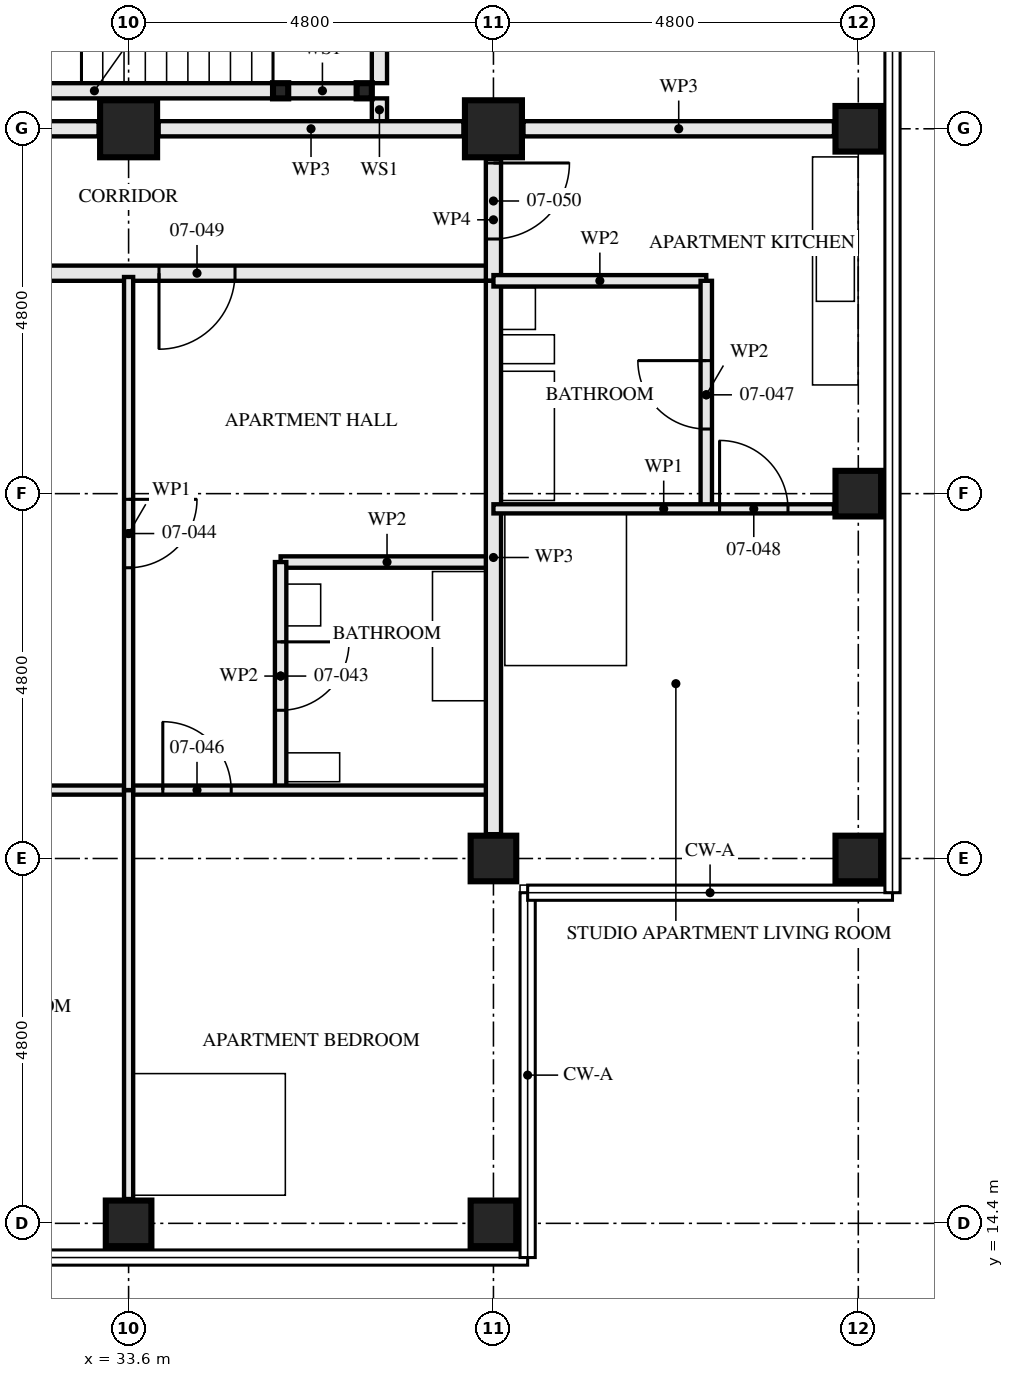
"""IFC4 building model, lengths in metres.
Left out: names, types, materials, properties, quantities, classifications, styles, units other than length and angle.
Written with IfcOpenShell. Run it as: python <this file> out.ifc"""

import sys

from ifc_helpers import new_model, si_unit, direction, frame, frame_2d, origin, origin_2d, place, context, subcontext, project, spatial, rectangle, hollow_rectangle, extrude, element, fill, save


model = new_model("IFC4")
c1 = context("Model", 3, precision=1e-05, world=origin(), true_north=direction((0.0, 1.0)))
c2 = subcontext(c1, "Body", "Model", "MODEL_VIEW")
j1 = project(units=[si_unit("LENGTHUNIT", "METRE"), si_unit("PLANEANGLEUNIT", "RADIAN")], contexts=[c1])
p1 = place(None, origin())
s1 = spatial("IfcSite", under=j1, at=p1, CompositionType="ELEMENT")
p2 = place(p1, origin())
s2 = spatial("IfcBuilding", under=s1, at=p2, CompositionType="ELEMENT")
p3 = place(p2, frame((0.0, 0.0, 30.5)))
s3 = spatial("IfcBuildingStorey", under=s2, at=p3, CompositionType="ELEMENT", Elevation=30.5)
p4 = place(p3, frame((33.6, 14.4, 0.0), z_axis=(0.0, 0.0, 1.0), x_axis=(0.0, 1.0, 0.0)))
e1 = element("IfcColumn", 1, at=p4, inside=s3, PredefinedType="COLUMN", context=c2, shape_type="SweptSolid", body=[
    extrude(hollow_rectangle(XDim=0.6, YDim=0.6, WallThickness=0.08, at=origin_2d()), origin(), (0.0, 0.0, 1.0), 3.5),
])
p5 = place(p3, frame((33.6, 28.8, 0.0), z_axis=(0.0, 0.0, 1.0), x_axis=(0.0, 1.0, 0.0)))
e2 = element("IfcColumn", 2, at=p5, inside=s3, PredefinedType="COLUMN", context=c2, shape_type="SweptSolid", body=[
    extrude(hollow_rectangle(XDim=0.75, YDim=0.75, WallThickness=0.08, at=origin_2d()), origin(), (0.0, 0.0, 1.0), 3.5),
])
for number, where, z_axis, x_axis in (
    (3, (38.4, 14.4, 0.0), (0.0, 0.0, 1.0), (0.0, 1.0, 0.0)),
    (4, (38.4, 19.2, 0.0), (0.0, 0.0, 1.0), (0.0, 1.0, 0.0)),
):
    element("IfcColumn", number, at=place(p3, frame(where, z_axis=z_axis, x_axis=x_axis)), inside=s3, PredefinedType="COLUMN", context=c2, shape_type="SweptSolid", body=[
        extrude(hollow_rectangle(XDim=0.6, YDim=0.6, WallThickness=0.08, at=origin_2d()), origin(), (0.0, 0.0, 1.0), 3.5),
    ])
p6 = place(p3, frame((38.4, 28.8, 0.0), z_axis=(0.0, 0.0, 1.0), x_axis=(0.0, 1.0, 0.0)))
e5 = element("IfcColumn", 5, at=p6, inside=s3, PredefinedType="COLUMN", context=c2, shape_type="SweptSolid", body=[
    extrude(hollow_rectangle(XDim=0.75, YDim=0.75, WallThickness=0.08, at=origin_2d()), origin(), (0.0, 0.0, 1.0), 3.5),
])
for number, where, z_axis, x_axis in (
    (6, (43.2, 19.2, 0.0), (0.0, 0.0, 1.0), (0.0, 1.0, 0.0)),
    (7, (43.2, 24.0, 0.0), (0.0, 0.0, 1.0), (1.0, 0.0, 0.0)),
    (8, (43.2, 28.8, 0.0), (0.0, 0.0, 1.0), (0.0, 1.0, 0.0)),
):
    element("IfcColumn", number, at=place(p3, frame(where, z_axis=z_axis, x_axis=x_axis)), inside=s3, PredefinedType="COLUMN", context=c2, shape_type="SweptSolid", body=[
        extrude(hollow_rectangle(XDim=0.6, YDim=0.6, WallThickness=0.08, at=origin_2d()), origin(), (0.0, 0.0, 1.0), 3.5),
    ])
for number, where, z_axis, x_axis in (
    (9, (36.7, 29.3, 0.0), (0.0, 0.0, 1.0), (1.0, 0.0, 0.0)),
    (10, (35.6, 29.3, 0.0), (0.0, 0.0, 1.0), (1.0, 0.0, 0.0)),
):
    element("IfcColumn", number, at=place(p3, frame(where, z_axis=z_axis, x_axis=x_axis)), inside=s3, PredefinedType="COLUMN", context=c2, shape_type="SweptSolid", body=[
        extrude(hollow_rectangle(XDim=0.2, YDim=0.2, WallThickness=0.008, at=origin_2d()), origin(), (0.0, 0.0, 1.0), 3.33),
    ])
p7 = place(p3, frame((35.6, 20.1, 0.0), z_axis=(0.0, 0.0, 1.0), x_axis=(0.0, 1.0, 0.0)))
e11 = element("IfcWall", 11, at=p7, inside=s3, PredefinedType="PARTITIONING", context=c2, shape_type="SweptSolid", body=[
    extrude(rectangle(XDim=3.0, YDim=0.15, at=frame_2d((1.5, 0.0))), origin(), (0.0, 0.0, 1.0), 3.33),
])
p8 = place(p7, frame((1.05, 0.0, 0.0)))
e12 = element("IfcOpeningElement", 12, at=p8, cuts=e11, PredefinedType="OPENING", context=c2, shape_type="SweptSolid", body=[
    extrude(rectangle(XDim=0.9, YDim=2.1, at=frame_2d((0.45, 1.05))), frame((0.0, 0.085, 0.0), z_axis=(0.0, -1.0, 0.0), x_axis=(1.0, 0.0, 0.0)), (0.0, 0.0, 1.0), 0.171),
])
p9 = place(p3, frame((35.6, 23.1, 0.0), z_axis=(0.0, 0.0, 1.0), x_axis=(1.0, 0.0, 0.0)))
e13 = element("IfcWall", 13, at=p9, inside=s3, PredefinedType="PARTITIONING", context=c2, shape_type="SweptSolid", body=[
    extrude(rectangle(XDim=2.8, YDim=0.15, at=frame_2d((1.4, 0.0))), origin(), (0.0, 0.0, 1.0), 3.33),
])
p10 = place(p3, frame((33.6, 20.1, 0.0), z_axis=(0.0, 0.0, 1.0), x_axis=(0.0, 1.0, 0.0)))
e14 = element("IfcWall", 14, at=p10, inside=s3, PredefinedType="PARTITIONING", context=c2, shape_type="SweptSolid", body=[
    extrude(rectangle(XDim=6.75, YDim=0.12, at=frame_2d((3.375, 0.0))), origin(), (0.0, 0.0, 1.0), 2.55),
])
p11 = place(p10, frame((2.925, 0.0, 0.0)))
e15 = element("IfcOpeningElement", 15, at=p11, cuts=e14, PredefinedType="OPENING", context=c2, shape_type="SweptSolid", body=[
    extrude(rectangle(XDim=0.9, YDim=2.1, at=frame_2d((0.45, 1.05))), frame((0.0, 0.071, 0.0), z_axis=(0.0, -1.0, 0.0), x_axis=(1.0, 0.0, 0.0)), (0.0, 0.0, 1.0), 0.141),
])
p12 = place(p3, frame((28.8, 20.1, 0.0), z_axis=(0.0, 0.0, 1.0), x_axis=(1.0, 0.0, 0.0)))
e16 = element("IfcWall", 16, at=p12, inside=s3, PredefinedType="PARTITIONING", context=c2, shape_type="SweptSolid", body=[
    extrude(rectangle(XDim=4.8, YDim=0.12, at=frame_2d((2.4, 0.0))), origin(), (0.0, 0.0, 1.0), 3.33),
])
p13 = place(p12, frame((0.45, 0.0, 0.0)))
e17 = element("IfcOpeningElement", 17, at=p13, cuts=e16, PredefinedType="OPENING", context=c2, shape_type="SweptSolid", body=[
    extrude(rectangle(XDim=0.9, YDim=2.1, at=frame_2d((0.45, 1.05))), frame((0.0, 0.071, 0.0), z_axis=(0.0, -1.0, 0.0), x_axis=(1.0, 0.0, 0.0)), (0.0, 0.0, 1.0), 0.141),
])
p14 = place(p3, frame((33.6, 20.1, 0.0), z_axis=(0.0, 0.0, 1.0), x_axis=(1.0, 0.0, 0.0)))
e18 = element("IfcWall", 18, at=p14, inside=s3, PredefinedType="PARTITIONING", context=c2, shape_type="SweptSolid", body=[
    extrude(rectangle(XDim=4.8, YDim=0.12, at=frame_2d((2.4, 0.0))), origin(), (0.0, 0.0, 1.0), 3.33),
])
p15 = place(p14, frame((0.45, 0.0, 0.0)))
e19 = element("IfcOpeningElement", 19, at=p15, cuts=e18, PredefinedType="OPENING", context=c2, shape_type="SweptSolid", body=[
    extrude(rectangle(XDim=0.9, YDim=2.1, at=frame_2d((0.45, 1.05))), frame((0.0, 0.071, 0.0), z_axis=(0.0, -1.0, 0.0), x_axis=(1.0, 0.0, 0.0)), (0.0, 0.0, 1.0), 0.141),
])
p16 = place(p3, frame((33.6, 14.72, 0.0), z_axis=(0.0, 0.0, 1.0), x_axis=(0.0, 1.0, 0.0)))
e20 = element("IfcWall", 20, at=p16, inside=s3, PredefinedType="PARTITIONING", context=c2, shape_type="SweptSolid", body=[
    extrude(rectangle(XDim=5.38, YDim=0.12, at=frame_2d((2.69, 0.0))), origin(), (0.0, 0.0, 1.0), 2.55),
])
p17 = place(p3, frame((38.4, 19.52, 0.0), z_axis=(0.0, 0.0, 1.0), x_axis=(0.0, 1.0, 0.0)))
e21 = element("IfcWall", 21, at=p17, inside=s3, PredefinedType="PARTITIONING", context=c2, shape_type="SweptSolid", body=[
    extrude(rectangle(XDim=7.28, YDim=0.2, at=frame_2d((3.64, 0.0))), origin(), (0.0, 0.0, 1.0), 2.55),
])
p18 = place(p3, frame((41.2, 23.8, 0.0), z_axis=(0.0, 0.0, 1.0), x_axis=(0.0, 1.0, 0.0)))
e22 = element("IfcWall", 22, at=p18, inside=s3, PredefinedType="PARTITIONING", context=c2, shape_type="SweptSolid", body=[
    extrude(rectangle(XDim=3.0, YDim=0.15, at=frame_2d((1.5, 0.0))), origin(), (0.0, 0.0, 1.0), 2.55),
])
p19 = place(p18, frame((1.05, 0.0, 0.0)))
e23 = element("IfcOpeningElement", 23, at=p19, cuts=e22, PredefinedType="OPENING", context=c2, shape_type="SweptSolid", body=[
    extrude(rectangle(XDim=0.9, YDim=2.1, at=frame_2d((0.45, 1.05))), frame((0.0, 0.085, 0.0), z_axis=(0.0, -1.0, 0.0), x_axis=(1.0, 0.0, 0.0)), (0.0, 0.0, 1.0), 0.171),
])
p20 = place(p3, frame((38.4, 26.8, 0.0), z_axis=(0.0, 0.0, 1.0), x_axis=(1.0, 0.0, 0.0)))
e24 = element("IfcWall", 24, at=p20, inside=s3, PredefinedType="PARTITIONING", context=c2, shape_type="SweptSolid", body=[
    extrude(rectangle(XDim=2.8, YDim=0.15, at=frame_2d((1.4, 0.0))), origin(), (0.0, 0.0, 1.0), 3.33),
])
p21 = place(p3, frame((38.4, 23.8, 0.0), z_axis=(0.0, 0.0, 1.0), x_axis=(1.0, 0.0, 0.0)))
e25 = element("IfcWall", 25, at=p21, inside=s3, PredefinedType="PARTITIONING", context=c2, shape_type="SweptSolid", body=[
    extrude(rectangle(XDim=4.48, YDim=0.12, at=frame_2d((2.24, 0.0))), origin(), (0.0, 0.0, 1.0), 3.33),
])
p22 = place(p21, frame((2.975, 0.0, 0.0)))
e26 = element("IfcOpeningElement", 26, at=p22, cuts=e25, PredefinedType="OPENING", context=c2, shape_type="SweptSolid", body=[
    extrude(rectangle(XDim=0.9, YDim=2.1, at=frame_2d((0.45, 1.05))), frame((0.0, 0.071, 0.0), z_axis=(0.0, -1.0, 0.0), x_axis=(1.0, 0.0, 0.0)), (0.0, 0.0, 1.0), 0.141),
])
p23 = place(p3, frame((28.8, 26.9, 0.0), z_axis=(0.0, 0.0, 1.0), x_axis=(1.0, 0.0, 0.0)))
e27 = element("IfcWall", 27, at=p23, inside=s3, PredefinedType="PARTITIONING", context=c2, shape_type="SweptSolid", body=[
    extrude(rectangle(XDim=9.6, YDim=0.2, at=frame_2d((4.8, 0.0))), origin(), (0.0, 0.0, 1.0), 3.33),
])
p24 = place(p23, frame((5.2, 0.0, 0.0)))
e28 = element("IfcOpeningElement", 28, at=p24, cuts=e27, PredefinedType="OPENING", context=c2, shape_type="SweptSolid", body=[
    extrude(rectangle(XDim=1.0, YDim=2.1, at=frame_2d((0.5, 1.05))), frame((0.0, 0.111, 0.0), z_axis=(0.0, -1.0, 0.0), x_axis=(1.0, 0.0, 0.0)), (0.0, 0.0, 1.0), 0.221),
])
p25 = place(p3, frame((38.4, 26.8, 0.0), z_axis=(0.0, 0.0, 1.0), x_axis=(0.0, 1.0, 0.0)))
e29 = element("IfcWall", 29, at=p25, inside=s3, PredefinedType="PARTITIONING", context=c2, shape_type="SweptSolid", body=[
    extrude(rectangle(XDim=1.605, YDim=0.2, at=frame_2d((0.802, 0.0))), origin(), (0.0, 0.0, 1.0), 3.33),
])
p26 = place(p25, frame((0.55, 0.0, 0.0)))
e30 = element("IfcOpeningElement", 30, at=p26, cuts=e29, PredefinedType="OPENING", context=c2, shape_type="SweptSolid", body=[
    extrude(rectangle(XDim=1.0, YDim=2.1, at=frame_2d((0.5, 1.05))), frame((0.0, 0.111, 0.0), z_axis=(0.0, -1.0, 0.0), x_axis=(1.0, 0.0, 0.0)), (0.0, 0.0, 1.0), 0.221),
])
p27 = place(p3, frame((36.6, 29.3, 0.0), z_axis=(0.0, 0.0, 1.0), x_axis=(-1.0, 0.0, 0.0)))
e31 = element("IfcWall", 31, at=p27, inside=s3, PredefinedType="SOLIDWALL", context=c2, shape_type="SweptSolid", body=[
    extrude(rectangle(XDim=0.9, YDim=0.2, at=frame_2d((0.45, 0.0))), origin(), (0.0, 0.0, 1.0), 2.99),
])
p28 = place(p3, frame((35.5, 29.3, 0.0), z_axis=(0.0, 0.0, 1.0), x_axis=(-1.0, 0.0, 0.0)))
e32 = element("IfcWall", 32, at=p28, inside=s3, PredefinedType="SOLIDWALL", context=c2, shape_type="SweptSolid", body=[
    extrude(rectangle(XDim=4.7, YDim=0.2, at=frame_2d((2.35, 0.0))), origin(), (0.0, 0.0, 1.0), 2.99),
])
p29 = place(p3, frame((36.9, 28.9, 0.0), z_axis=(0.0, 0.0, 1.0), x_axis=(0.0, 1.0, 0.0)))
e33 = element("IfcWall", 33, at=p29, inside=s3, PredefinedType="SOLIDWALL", context=c2, shape_type="SweptSolid", body=[
    extrude(rectangle(XDim=0.3, YDim=0.2, at=frame_2d((0.15, 0.0))), origin(), (0.0, 0.0, 1.0), 3.33),
])
p30 = place(p3, frame((36.9, 29.4, 0.0), z_axis=(0.0, 0.0, 1.0), x_axis=(0.0, 1.0, 0.0)))
e34 = element("IfcWall", 34, at=p30, inside=s3, PredefinedType="SOLIDWALL", context=c2, shape_type="SweptSolid", body=[
    extrude(rectangle(XDim=2.6, YDim=0.2, at=frame_2d((1.3, 0.0))), origin(), (0.0, 0.0, 1.0), 3.33),
])
p31 = place(p3, frame((42.88, 28.8, 0.0), z_axis=(0.0, 0.0, 1.0), x_axis=(-1.0, 0.0, 0.0)))
e35 = element("IfcWall", 35, at=p31, inside=s3, PredefinedType="PARTITIONING", context=c2, shape_type="SweptSolid", body=[
    extrude(rectangle(XDim=4.085, YDim=0.2, at=frame_2d((2.042, 0.0))), origin(), (0.0, 0.0, 1.0), 2.32),
])
p32 = place(p3, frame((38.005, 28.8, 0.0), z_axis=(0.0, 0.0, 1.0), x_axis=(-1.0, 0.0, 0.0)))
e36 = element("IfcWall", 36, at=p32, inside=s3, PredefinedType="PARTITIONING", context=c2, shape_type="SweptSolid", body=[
    extrude(rectangle(XDim=4.01, YDim=0.2, at=frame_2d((2.005, 0.0))), origin(), (0.0, 0.0, 1.0), 2.32),
])
p33 = place(p3, frame((33.205, 28.8, 0.0), z_axis=(0.0, 0.0, 1.0), x_axis=(-1.0, 0.0, 0.0)))
e37 = element("IfcWall", 37, at=p33, inside=s3, PredefinedType="PARTITIONING", context=c2, shape_type="SweptSolid", body=[
    extrude(rectangle(XDim=2.505, YDim=0.2, at=frame_2d((1.252, 0.0))), origin(), (0.0, 0.0, 1.0), 2.32),
])
p34 = place(p8, frame((0.9, 0.0, 0.0), z_axis=(0.0, 0.0, 1.0), x_axis=(-1.0, 0.0, 0.0)))
e38 = element("IfcDoor", 38, at=p34, inside=s3, OperationType="SINGLE_SWING_RIGHT", PredefinedType="DOOR", context=c2, shape_type="SweptSolid", body=[
    extrude(rectangle(XDim=0.9, YDim=2.1, at=frame_2d((0.45, 1.05))), frame((0.0, 0.022, 0.0), z_axis=(0.0, -1.0, 0.0), x_axis=(1.0, 0.0, 0.0)), (0.0, 0.0, 1.0), 0.044),
])
fill(e12, e38)
p35 = place(p11, frame((0.9, 0.0, 0.0), z_axis=(0.0, 0.0, 1.0), x_axis=(-1.0, 0.0, 0.0)))
e39 = element("IfcDoor", 39, at=p35, inside=s3, OperationType="SINGLE_SWING_RIGHT", PredefinedType="DOOR", context=c2, shape_type="SweptSolid", body=[
    extrude(rectangle(XDim=0.9, YDim=2.1, at=frame_2d((0.45, 1.05))), frame((0.0, 0.022, 0.0), z_axis=(0.0, -1.0, 0.0), x_axis=(1.0, 0.0, 0.0)), (0.0, 0.0, 1.0), 0.044),
])
fill(e15, e39)
p36 = place(p15, origin())
e40 = element("IfcDoor", 40, at=p36, inside=s3, OperationType="SINGLE_SWING_RIGHT", PredefinedType="DOOR", context=c2, shape_type="SweptSolid", body=[
    extrude(rectangle(XDim=0.9, YDim=2.1, at=frame_2d((0.45, 1.05))), frame((0.0, 0.022, 0.0), z_axis=(0.0, -1.0, 0.0), x_axis=(1.0, 0.0, 0.0)), (0.0, 0.0, 1.0), 0.044),
])
fill(e19, e40)
p37 = place(p19, origin())
e41 = element("IfcDoor", 41, at=p37, inside=s3, OperationType="SINGLE_SWING_LEFT", PredefinedType="DOOR", context=c2, shape_type="SweptSolid", body=[
    extrude(rectangle(XDim=0.9, YDim=2.1, at=frame_2d((0.45, 1.05))), frame((0.0, 0.022, 0.0), z_axis=(0.0, -1.0, 0.0), x_axis=(1.0, 0.0, 0.0)), (0.0, 0.0, 1.0), 0.044),
])
fill(e23, e41)
p38 = place(p22, origin())
e42 = element("IfcDoor", 42, at=p38, inside=s3, OperationType="SINGLE_SWING_RIGHT", PredefinedType="DOOR", context=c2, shape_type="SweptSolid", body=[
    extrude(rectangle(XDim=0.9, YDim=2.1, at=frame_2d((0.45, 1.05))), frame((0.0, 0.022, 0.0), z_axis=(0.0, -1.0, 0.0), x_axis=(1.0, 0.0, 0.0)), (0.0, 0.0, 1.0), 0.044),
])
fill(e26, e42)
p39 = place(p24, frame((1.0, 0.0, 0.0), z_axis=(0.0, 0.0, 1.0), x_axis=(-1.0, 0.0, 0.0)))
e43 = element("IfcDoor", 43, at=p39, inside=s3, OperationType="SINGLE_SWING_LEFT", PredefinedType="DOOR", context=c2, shape_type="SweptSolid", body=[
    extrude(rectangle(XDim=1.0, YDim=2.1, at=frame_2d((0.5, 1.05))), frame((0.0, 0.027, 0.0), z_axis=(0.0, -1.0, 0.0), x_axis=(1.0, 0.0, 0.0)), (0.0, 0.0, 1.0), 0.054),
])
fill(e28, e43)
p40 = place(p26, frame((1.0, 0.0, 0.0), z_axis=(0.0, 0.0, 1.0), x_axis=(-1.0, 0.0, 0.0)))
e44 = element("IfcDoor", 44, at=p40, inside=s3, OperationType="SINGLE_SWING_RIGHT", PredefinedType="DOOR", context=c2, shape_type="SweptSolid", body=[
    extrude(rectangle(XDim=1.0, YDim=2.1, at=frame_2d((0.5, 1.05))), frame((0.0, 0.027, 0.0), z_axis=(0.0, -1.0, 0.0), x_axis=(1.0, 0.0, 0.0)), (0.0, 0.0, 1.0), 0.054),
])
fill(e30, e44)
save(model, sys.argv[1])
